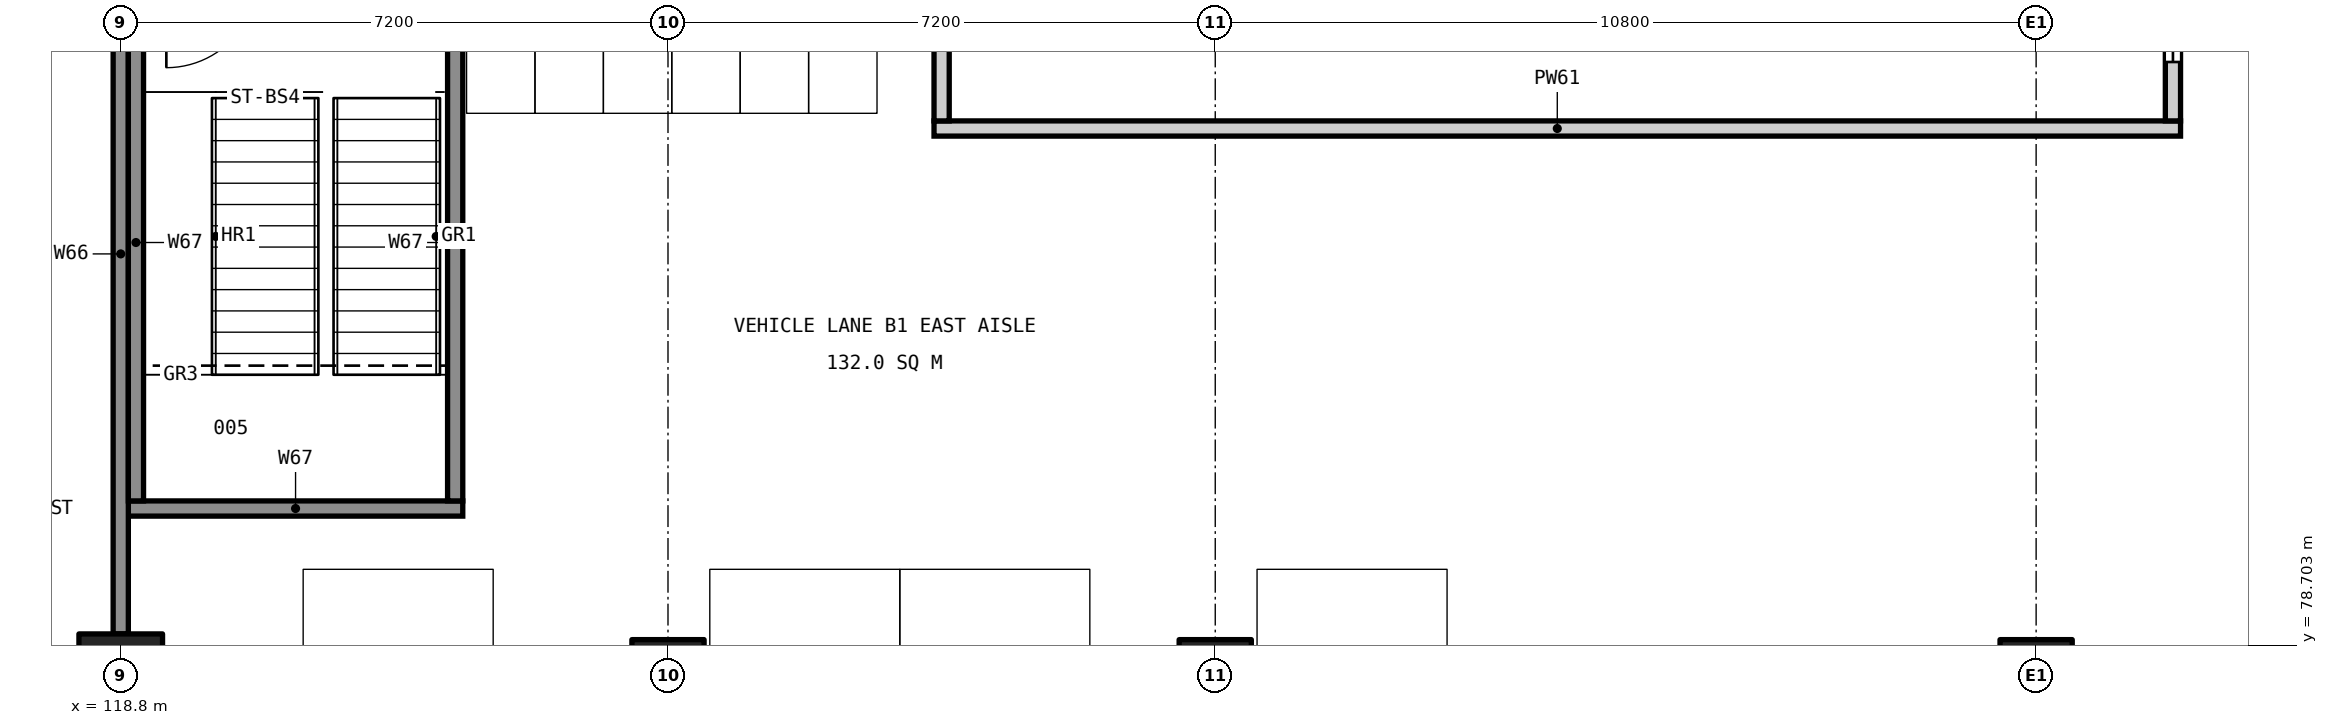
"""IFC4 building model, lengths in metres.
Left out: names, types, materials, properties, quantities, classifications, styles, units other than length and angle.
Written with IfcOpenShell. Run it as: python <this file> out.ifc"""

import sys

from ifc_helpers import new_model, si_unit, direction, frame, frame_2d, origin, origin_2d, place, context, subcontext, project, spatial, rectangle, extrude, element, fill, save


model = new_model("IFC4")
c1 = context("Model", 3, precision=1e-05, world=origin(), true_north=direction((0.0, 1.0)))
c2 = subcontext(c1, "Body", "Model", "MODEL_VIEW")
j1 = project(units=[si_unit("LENGTHUNIT", "METRE"), si_unit("PLANEANGLEUNIT", "RADIAN")], contexts=[c1])
p1 = place(None, origin())
s1 = spatial("IfcSite", under=j1, at=p1, CompositionType="ELEMENT")
p2 = place(p1, origin())
s2 = spatial("IfcBuilding", under=s1, at=p2, CompositionType="ELEMENT")
p3 = place(p2, frame((0.0, 0.0, -4.8)))
s3 = spatial("IfcBuildingStorey", under=s2, at=p3, CompositionType="ELEMENT", Elevation=-4.8)
p4 = place(p3, frame((118.8, 78.3, 0.0), z_axis=(0.0, 0.0, 1.0), x_axis=(1.0, 0.0, 0.0)))
e1 = element("IfcColumn", 1, at=p4, inside=s3, PredefinedType="COLUMN", context=c2, shape_type="SweptSolid", body=[
    extrude(rectangle(XDim=1.1, YDim=1.1, at=origin_2d()), origin(), (0.0, 0.0, 1.0), 4.5),
])
for number, where, z_axis, x_axis in (
    (2, (126.0, 78.3, 0.0), (0.0, 0.0, 1.0), (1.0, 0.0, 0.0)),
    (3, (133.2, 78.3, 0.0), (0.0, 0.0, 1.0), (1.0, 0.0, 0.0)),
    (4, (144.0, 78.3, 0.0), (0.0, 0.0, 1.0), (1.0, 0.0, 0.0)),
):
    element("IfcColumn", number, at=place(p3, frame(where, z_axis=z_axis, x_axis=x_axis)), inside=s3, PredefinedType="COLUMN", context=c2, shape_type="SweptSolid", body=[
        extrude(rectangle(XDim=0.95, YDim=0.95, at=origin_2d()), origin(), (0.0, 0.0, 1.0), 4.35),
    ])
p5 = place(p3, frame((118.9, 80.5, 0.0), z_axis=(0.0, 0.0, 1.0), x_axis=(1.0, 0.0, 0.0)))
e5 = element("IfcWall", 5, at=p5, inside=s3, PredefinedType="SOLIDWALL", context=c2, shape_type="SweptSolid", body=[
    extrude(rectangle(XDim=4.4, YDim=0.2, at=frame_2d((2.2, 0.0))), origin(), (0.0, 0.0, 1.0), 4.35),
])
p6 = place(p3, frame((129.5, 85.5, 0.0), z_axis=(0.0, 0.0, 1.0), x_axis=(1.0, 0.0, 0.0)))
e6 = element("IfcWall", 6, at=p6, inside=s3, PredefinedType="PARTITIONING", context=c2, shape_type="SweptSolid", body=[
    extrude(rectangle(XDim=16.4, YDim=0.2, at=frame_2d((8.2, 0.0))), origin(), (0.0, 0.0, 1.0), 4.35),
])
p7 = place(p3, frame((118.8, 78.85, 0.0), z_axis=(0.0, 0.0, 1.0), x_axis=(0.0, 1.0, 0.0)))
e7 = element("IfcWall", 7, at=p7, inside=s3, PredefinedType="SOLIDWALL", context=c2, shape_type="SweptSolid", body=[
    extrude(rectangle(XDim=10.0, YDim=0.2, at=frame_2d((5.0, 0.0))), origin(), (0.0, 0.0, 1.0), 4.5),
])
p8 = place(p3, frame((119.0, 80.6, 0.0), z_axis=(0.0, 0.0, 1.0), x_axis=(0.0, 1.0, 0.0)))
e8 = element("IfcWall", 8, at=p8, inside=s3, PredefinedType="SOLIDWALL", context=c2, shape_type="SweptSolid", body=[
    extrude(rectangle(XDim=6.8, YDim=0.2, at=frame_2d((3.4, 0.0))), origin(), (0.0, 0.0, 1.0), 4.5),
])
p9 = place(p3, frame((123.2, 80.6, 0.0), z_axis=(0.0, 0.0, 1.0), x_axis=(0.0, 1.0, 0.0)))
e9 = element("IfcWall", 9, at=p9, inside=s3, PredefinedType="SOLIDWALL", context=c2, shape_type="SweptSolid", body=[
    extrude(rectangle(XDim=6.8, YDim=0.2, at=frame_2d((3.4, 0.0))), origin(), (0.0, 0.0, 1.0), 4.35),
])
p10 = place(p3, frame((129.6, 85.6, 0.0), z_axis=(0.0, 0.0, 1.0), x_axis=(0.0, 1.0, 0.0)))
e10 = element("IfcWall", 10, at=p10, inside=s3, PredefinedType="PARTITIONING", context=c2, shape_type="SweptSolid", body=[
    extrude(rectangle(XDim=7.3, YDim=0.2, at=frame_2d((3.65, 0.0))), origin(), (0.0, 0.0, 1.0), 4.35),
])
p11 = place(p3, frame((145.8, 85.6, 0.0), z_axis=(0.0, 0.0, 1.0), x_axis=(0.0, 1.0, 0.0)))
e11 = element("IfcWall", 11, at=p11, inside=s3, PredefinedType="PARTITIONING", context=c2, shape_type="SweptSolid", body=[
    extrude(rectangle(XDim=7.3, YDim=0.2, at=frame_2d((3.65, 0.0))), origin(), (0.0, 0.0, 1.0), 4.35),
])
p12 = place(p11, frame((0.775, 0.0, 0.0)))
e12 = element("IfcOpeningElement", 12, at=p12, cuts=e11, PredefinedType="OPENING", context=c2, shape_type="SweptSolid", body=[
    extrude(rectangle(XDim=3.5, YDim=3.8, at=frame_2d((1.75, 1.9))), frame((0.0, 0.11, 0.0), z_axis=(0.0, -1.0, 0.0), x_axis=(1.0, 0.0, 0.0)), (0.0, 0.0, 1.0), 0.22),
])
p13 = place(p11, frame((5.775, 0.0, 0.0)))
e13 = element("IfcOpeningElement", 13, at=p13, cuts=e11, PredefinedType="OPENING", context=c2, shape_type="SweptSolid", body=[
    extrude(rectangle(XDim=1.0, YDim=2.1, at=frame_2d((0.5, 1.05))), frame((0.0, 0.11, 0.0), z_axis=(0.0, -1.0, 0.0), x_axis=(1.0, 0.0, 0.0)), (0.0, 0.0, 1.0), 0.22),
])
p14 = place(p12, frame((3.5, 0.0, 0.0), z_axis=(0.0, 0.0, 1.0), x_axis=(-1.0, 0.0, 0.0)))
e14 = element("IfcDoor", 14, at=p14, inside=s3, OperationType="ROLLINGUP", PredefinedType="DOOR", context=c2, shape_type="SweptSolid", body=[
    extrude(rectangle(XDim=3.5, YDim=3.8, at=frame_2d((1.75, 1.9))), frame((0.0, 0.025, 0.0), z_axis=(0.0, -1.0, 0.0), x_axis=(1.0, 0.0, 0.0)), (0.0, 0.0, 1.0), 0.05),
])
fill(e12, e14)
save(model, sys.argv[1])
